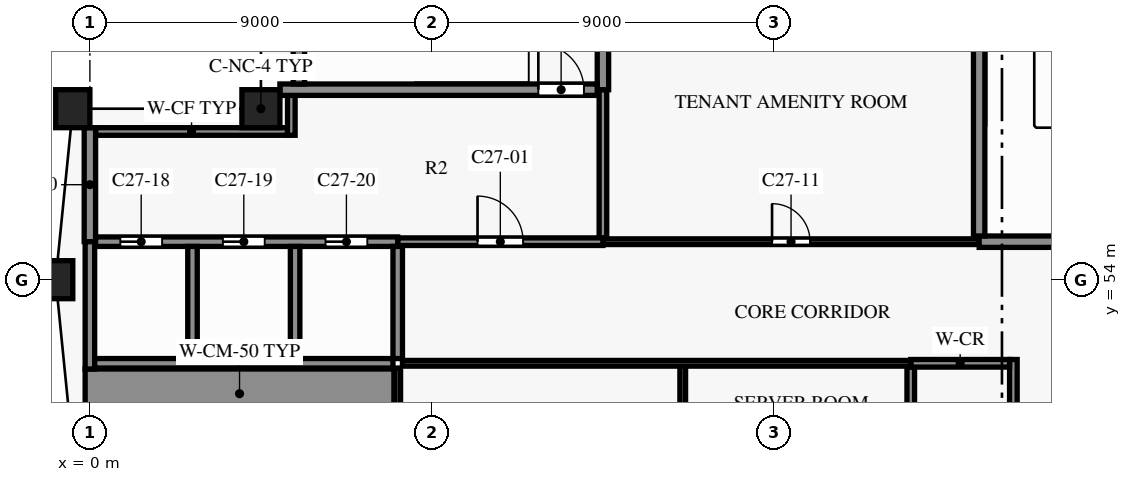
"""IFC4 building model, lengths in metres.
Left out: names, types, materials, properties, quantities, classifications, styles, units other than length and angle.
Written with IfcOpenShell. Run it as: python <this file> out.ifc"""

import sys

from ifc_helpers import new_model, si_unit, direction, frame, frame_2d, origin, origin_2d, place, context, subcontext, project, spatial, rectangle, extrude, element, fill, save


model = new_model("IFC4")
c1 = context("Model", 3, precision=1e-05, world=origin(), true_north=direction((0.0, 1.0)))
c2 = subcontext(c1, "Body", "Model", "MODEL_VIEW")
j1 = project(units=[si_unit("LENGTHUNIT", "METRE"), si_unit("PLANEANGLEUNIT", "RADIAN")], contexts=[c1])
p1 = place(None, origin())
s1 = spatial("IfcSite", under=j1, at=p1, CompositionType="ELEMENT")
p2 = place(p1, origin())
s2 = spatial("IfcBuilding", under=s1, at=p2, CompositionType="ELEMENT")
p3 = place(p2, frame((0.0, 0.0, 198.8)))
s3 = spatial("IfcBuildingStorey", under=s2, at=p3, CompositionType="ELEMENT", Elevation=198.8)
for number, where, z_axis, x_axis in (
    (1, (-0.45, 58.5, 0.0), (0.0, 0.0, 1.0), (-0.1, -0.995, 0.0)),
    (2, (-0.9, 54.0, 0.0), (0.0, 0.0, 1.0), (0.0, -1.0, 0.0)),
):
    element("IfcColumn", number, at=place(p3, frame(where, z_axis=z_axis, x_axis=x_axis)), inside=s3, PredefinedType="COLUMN", context=c2, shape_type="SweptSolid", body=[
        extrude(rectangle(XDim=0.9, YDim=1.0, at=origin_2d()), origin(), (0.0, 0.0, 1.0), 3.8),
    ])
p4 = place(p3, frame((4.5, 58.5, 0.0), z_axis=(0.0, 0.0, 1.0), x_axis=(1.0, 0.0, 0.0)))
e3 = element("IfcColumn", 3, at=p4, inside=s3, PredefinedType="COLUMN", context=c2, shape_type="SweptSolid", body=[
    extrude(rectangle(XDim=1.0, YDim=1.0, at=origin_2d()), origin(), (0.0, 0.0, 1.0), 3.8),
])
p5 = place(p3, frame((-0.125, 51.0, 0.0), z_axis=(0.0, 0.0, 1.0), x_axis=(1.0, 0.0, 0.0)))
e4 = element("IfcWall", 4, at=p5, inside=s3, PredefinedType="SHEAR", context=c2, shape_type="SweptSolid", body=[
    extrude(rectangle(XDim=8.125, YDim=1.3, at=frame_2d((4.062, 0.0))), origin(), (0.0, 0.0, 1.0), 3.5),
])
p6 = place(p3, frame((8.225, 51.8, 0.0), z_axis=(0.0, 0.0, 1.0), x_axis=(1.0, 0.0, 0.0)))
e5 = element("IfcWall", 5, at=p6, inside=s3, PredefinedType="PARTITIONING", context=c2, shape_type="SweptSolid", body=[
    extrude(rectangle(XDim=13.375, YDim=0.15, at=frame_2d((6.688, 0.0))), origin(), (0.0, 0.0, 1.0), 3.5),
])
p7 = place(p3, frame((21.6, 51.8, 0.0), z_axis=(0.0, 0.0, 1.0), x_axis=(1.0, 0.0, 0.0)))
e6 = element("IfcWall", 6, at=p7, inside=s3, PredefinedType="PARTITIONING", context=c2, shape_type="SweptSolid", body=[
    extrude(rectangle(XDim=2.6, YDim=0.2, at=frame_2d((1.3, 0.0))), origin(), (0.0, 0.0, 1.0), 3.5),
])
p8 = place(p3, frame((0.125, 51.8, 0.0), z_axis=(0.0, 0.0, 1.0), x_axis=(1.0, 0.0, 0.0)))
e7 = element("IfcWall", 7, at=p8, inside=s3, PredefinedType="SHEAR", context=c2, shape_type="SweptSolid", body=[
    extrude(rectangle(XDim=7.85, YDim=0.25, at=frame_2d((3.925, 0.0))), origin(), (0.0, 0.0, 1.0), 3.5),
])
p9 = place(p3, frame((8.1, 55.0, 0.0), z_axis=(0.0, 0.0, 1.0), x_axis=(1.0, 0.0, 0.0)))
e8 = element("IfcWall", 8, at=p9, inside=s3, PredefinedType="PARTITIONING", context=c2, shape_type="SweptSolid", body=[
    extrude(rectangle(XDim=5.4, YDim=0.2, at=frame_2d((2.7, 0.0))), origin(), (0.0, 0.0, 1.0), 3.5),
])
p10 = place(p9, frame((2.1, 0.0, 0.0)))
e9 = element("IfcOpeningElement", 9, at=p10, cuts=e8, PredefinedType="OPENING", context=c2, shape_type="SweptSolid", body=[
    extrude(rectangle(XDim=1.2, YDim=2.2, at=frame_2d((0.6, 1.1))), frame((0.0, 0.11, 0.0), z_axis=(0.0, -1.0, 0.0), x_axis=(1.0, 0.0, 0.0)), (0.0, 0.0, 1.0), 0.22),
])
p11 = place(p3, frame((13.5, 55.0, 0.0), z_axis=(0.0, 0.0, 1.0), x_axis=(1.0, 0.0, 0.0)))
e10 = element("IfcWall", 10, at=p11, inside=s3, PredefinedType="PARTITIONING", context=c2, shape_type="SweptSolid", body=[
    extrude(rectangle(XDim=9.9, YDim=0.15, at=frame_2d((4.95, 0.0))), origin(), (0.0, 0.0, 1.0), 3.5),
])
p12 = place(p11, frame((4.45, 0.0, 0.0)))
e11 = element("IfcOpeningElement", 11, at=p12, cuts=e10, PredefinedType="OPENING", context=c2, shape_type="SweptSolid", body=[
    extrude(rectangle(XDim=1.0, YDim=2.1, at=frame_2d((0.5, 1.05))), frame((0.0, 0.085, 0.0), z_axis=(0.0, -1.0, 0.0), x_axis=(1.0, 0.0, 0.0)), (0.0, 0.0, 1.0), 0.17),
])
p13 = place(p3, frame((0.15, 55.0, 0.0), z_axis=(0.0, 0.0, 1.0), x_axis=(1.0, 0.0, 0.0)))
e12 = element("IfcWall", 12, at=p13, inside=s3, PredefinedType="SHEAR", context=c2, shape_type="SweptSolid", body=[
    extrude(rectangle(XDim=7.95, YDim=0.25, at=frame_2d((3.975, 0.0))), origin(), (0.0, 0.0, 1.0), 3.5),
])
p14 = place(p13, frame((0.65, 0.0, 0.0)))
e13 = element("IfcOpeningElement", 13, at=p14, cuts=e12, PredefinedType="OPENING", context=c2, shape_type="SweptSolid", body=[
    extrude(rectangle(XDim=1.1, YDim=2.1, at=frame_2d((0.55, 1.05))), frame((0.0, 0.135, 0.0), z_axis=(0.0, -1.0, 0.0), x_axis=(1.0, 0.0, 0.0)), (0.0, 0.0, 1.0), 0.27),
])
p15 = place(p13, frame((3.35, 0.0, 0.0)))
e14 = element("IfcOpeningElement", 14, at=p15, cuts=e12, PredefinedType="OPENING", context=c2, shape_type="SweptSolid", body=[
    extrude(rectangle(XDim=1.1, YDim=2.1, at=frame_2d((0.55, 1.05))), frame((0.0, 0.135, 0.0), z_axis=(0.0, -1.0, 0.0), x_axis=(1.0, 0.0, 0.0)), (0.0, 0.0, 1.0), 0.27),
])
p16 = place(p13, frame((6.05, 0.0, 0.0)))
e15 = element("IfcOpeningElement", 15, at=p16, cuts=e12, PredefinedType="OPENING", context=c2, shape_type="SweptSolid", body=[
    extrude(rectangle(XDim=1.1, YDim=2.1, at=frame_2d((0.55, 1.05))), frame((0.0, 0.135, 0.0), z_axis=(0.0, -1.0, 0.0), x_axis=(1.0, 0.0, 0.0)), (0.0, 0.0, 1.0), 0.27),
])
p17 = place(p3, frame((23.4, 55.0, 0.0), z_axis=(0.0, 0.0, 1.0), x_axis=(1.0, 0.0, 0.0)))
e16 = element("IfcWall", 16, at=p17, inside=s3, PredefinedType="SHEAR", context=c2, shape_type="SweptSolid", body=[
    extrude(rectangle(XDim=3.45, YDim=0.3, at=frame_2d((1.725, 0.0))), origin(), (0.0, 0.0, 1.0), 3.5),
])
p18 = place(p3, frame((0.15, 57.9, 0.0), z_axis=(0.0, 0.0, 1.0), x_axis=(1.0, 0.0, 0.0)))
e17 = element("IfcWall", 17, at=p18, inside=s3, PredefinedType="PARTITIONING", context=c2, shape_type="SweptSolid", body=[
    extrude(rectangle(XDim=5.05, YDim=0.2, at=frame_2d((2.525, 0.0))), origin(), (0.0, 0.0, 1.0), 3.5),
])
p19 = place(p3, frame((5.0, 59.0, 0.0), z_axis=(0.0, 0.0, 1.0), x_axis=(1.0, 0.0, 0.0)))
e18 = element("IfcWall", 18, at=p19, inside=s3, PredefinedType="SHEAR", context=c2, shape_type="SweptSolid", body=[
    extrude(rectangle(XDim=8.35, YDim=0.3, at=frame_2d((4.175, 0.0))), origin(), (0.0, 0.0, 1.0), 3.5),
])
p20 = place(p19, frame((6.8, 0.0, 0.0)))
e19 = element("IfcOpeningElement", 19, at=p20, cuts=e18, PredefinedType="OPENING", context=c2, shape_type="SweptSolid", body=[
    extrude(rectangle(XDim=1.2, YDim=2.2, at=frame_2d((0.6, 1.1))), frame((0.0, 0.16, 0.0), z_axis=(0.0, -1.0, 0.0), x_axis=(1.0, 0.0, 0.0)), (0.0, 0.0, 1.0), 0.32),
])
p21 = place(p3, frame((0.0, 55.0, 0.0), z_axis=(0.0, 0.0, 1.0), x_axis=(0.0, 1.0, 0.0)))
e20 = element("IfcWall", 20, at=p21, inside=s3, PredefinedType="SHEAR", context=c2, shape_type="SweptSolid", body=[
    extrude(rectangle(XDim=3.0, YDim=0.3, at=frame_2d((1.5, 0.0))), origin(), (0.0, 0.0, 1.0), 3.5),
])
p22 = place(p3, frame((0.0, 51.65, 0.0), z_axis=(0.0, 0.0, 1.0), x_axis=(0.0, 1.0, 0.0)))
e21 = element("IfcWall", 21, at=p22, inside=s3, PredefinedType="SHEAR", context=c2, shape_type="SweptSolid", body=[
    extrude(rectangle(XDim=3.35, YDim=0.25, at=frame_2d((1.675, 0.0))), origin(), (0.0, 0.0, 1.0), 3.5),
])
p23 = place(p3, frame((2.7, 51.925, 0.0), z_axis=(0.0, 0.0, 1.0), x_axis=(0.0, 1.0, 0.0)))
e22 = element("IfcWall", 22, at=p23, inside=s3, PredefinedType="SHEAR", context=c2, shape_type="SweptSolid", body=[
    extrude(rectangle(XDim=2.95, YDim=0.25, at=frame_2d((1.475, 0.0))), origin(), (0.0, 0.0, 1.0), 3.5),
])
p24 = place(p3, frame((5.3, 57.8, 0.0), z_axis=(0.0, 0.0, 1.0), x_axis=(0.0, 1.0, 0.0)))
e23 = element("IfcWall", 23, at=p24, inside=s3, PredefinedType="PARTITIONING", context=c2, shape_type="SweptSolid", body=[
    extrude(rectangle(XDim=1.05, YDim=0.2, at=frame_2d((0.525, 0.0))), origin(), (0.0, 0.0, 1.0), 3.5),
])
p25 = place(p3, frame((5.4, 51.925, 0.0), z_axis=(0.0, 0.0, 1.0), x_axis=(0.0, 1.0, 0.0)))
e24 = element("IfcWall", 24, at=p25, inside=s3, PredefinedType="SHEAR", context=c2, shape_type="SweptSolid", body=[
    extrude(rectangle(XDim=2.95, YDim=0.25, at=frame_2d((1.475, 0.0))), origin(), (0.0, 0.0, 1.0), 3.5),
])
p26 = place(p3, frame((5.5, 59.15, 0.0), z_axis=(0.0, 0.0, 1.0), x_axis=(0.0, 1.0, 0.0)))
e25 = element("IfcWall", 25, at=p26, inside=s3, PredefinedType="SHEAR", context=c2, shape_type="SweptSolid", body=[
    extrude(rectangle(XDim=3.6, YDim=0.3, at=frame_2d((1.8, 0.0))), origin(), (0.0, 0.0, 1.0), 3.5),
])
p27 = place(p3, frame((8.1, 50.2, 0.0), z_axis=(0.0, 0.0, 1.0), x_axis=(0.0, 1.0, 0.0)))
e26 = element("IfcWall", 26, at=p27, inside=s3, PredefinedType="PARTITIONING", context=c2, shape_type="SweptSolid", body=[
    extrude(rectangle(XDim=1.475, YDim=0.15, at=frame_2d((0.738, 0.0))), origin(), (0.0, 0.0, 1.0), 3.5),
])
p28 = place(p3, frame((8.1, 51.925, 0.0), z_axis=(0.0, 0.0, 1.0), x_axis=(0.0, 1.0, 0.0)))
e27 = element("IfcWall", 27, at=p28, inside=s3, PredefinedType="SHEAR", context=c2, shape_type="SweptSolid", body=[
    extrude(rectangle(XDim=2.95, YDim=0.25, at=frame_2d((1.475, 0.0))), origin(), (0.0, 0.0, 1.0), 3.5),
])
p29 = place(p3, frame((13.5, 55.1, 0.0), z_axis=(0.0, 0.0, 1.0), x_axis=(0.0, 1.0, 0.0)))
e28 = element("IfcWall", 28, at=p29, inside=s3, PredefinedType="PARTITIONING", context=c2, shape_type="SweptSolid", body=[
    extrude(rectangle(XDim=3.9, YDim=0.2, at=frame_2d((1.95, 0.0))), origin(), (0.0, 0.0, 1.0), 3.5),
])
p30 = place(p3, frame((13.5, 59.0, 0.0), z_axis=(0.0, 0.0, 1.0), x_axis=(0.0, 1.0, 0.0)))
e29 = element("IfcWall", 29, at=p30, inside=s3, PredefinedType="SHEAR", context=c2, shape_type="SweptSolid", body=[
    extrude(rectangle(XDim=3.948, YDim=0.3, at=frame_2d((1.974, 0.0))), origin(), (0.0, 0.0, 1.0), 3.5),
])
p31 = place(p3, frame((15.6, 47.075, 0.0), z_axis=(0.0, 0.0, 1.0), x_axis=(0.0, 1.0, 0.0)))
e30 = element("IfcWall", 30, at=p31, inside=s3, PredefinedType="PARTITIONING", context=c2, shape_type="SweptSolid", body=[
    extrude(rectangle(XDim=4.65, YDim=0.15, at=frame_2d((2.325, 0.0))), origin(), (0.0, 0.0, 1.0), 3.5),
])
p32 = place(p3, frame((21.6, 47.1, 0.0), z_axis=(0.0, 0.0, 1.0), x_axis=(0.0, 1.0, 0.0)))
e31 = element("IfcWall", 31, at=p32, inside=s3, PredefinedType="PARTITIONING", context=c2, shape_type="SweptSolid", body=[
    extrude(rectangle(XDim=4.6, YDim=0.2, at=frame_2d((2.3, 0.0))), origin(), (0.0, 0.0, 1.0), 3.5),
])
p33 = place(p3, frame((23.4, 55.15, 0.0), z_axis=(0.0, 0.0, 1.0), x_axis=(0.0, 1.0, 0.0)))
e32 = element("IfcWall", 32, at=p33, inside=s3, PredefinedType="SHEAR", context=c2, shape_type="SweptSolid", body=[
    extrude(rectangle(XDim=8.0, YDim=0.3, at=frame_2d((4.0, 0.0))), origin(), (0.0, 0.0, 1.0), 3.5),
])
p34 = place(p3, frame((24.3, 46.9, 0.0), z_axis=(0.0, 0.0, 1.0), x_axis=(0.0, 1.0, 0.0)))
e33 = element("IfcWall", 33, at=p34, inside=s3, PredefinedType="SHEAR", context=c2, shape_type="SweptSolid", body=[
    extrude(rectangle(XDim=5.0, YDim=0.2, at=frame_2d((2.5, 0.0))), origin(), (0.0, 0.0, 1.0), 3.5),
])
p35 = place(p10, origin())
e34 = element("IfcDoor", 34, at=p35, inside=s3, OperationType="SINGLE_SWING_RIGHT", PredefinedType="DOOR", context=c2, shape_type="SweptSolid", body=[
    extrude(rectangle(XDim=1.2, YDim=2.2, at=frame_2d((0.6, 1.1))), frame((0.0, 0.025, 0.0), z_axis=(0.0, -1.0, 0.0), x_axis=(1.0, 0.0, 0.0)), (0.0, 0.0, 1.0), 0.05),
])
fill(e9, e34)
p36 = place(p12, origin())
e35 = element("IfcDoor", 35, at=p36, inside=s3, OperationType="SINGLE_SWING_LEFT", PredefinedType="DOOR", context=c2, shape_type="SweptSolid", body=[
    extrude(rectangle(XDim=1.0, YDim=2.1, at=frame_2d((0.5, 1.05))), frame((0.0, 0.025, 0.0), z_axis=(0.0, -1.0, 0.0), x_axis=(1.0, 0.0, 0.0)), (0.0, 0.0, 1.0), 0.05),
])
fill(e11, e35)
p37 = place(p20, origin())
e36 = element("IfcDoor", 36, at=p37, inside=s3, OperationType="SINGLE_SWING_RIGHT", PredefinedType="DOOR", context=c2, shape_type="SweptSolid", body=[
    extrude(rectangle(XDim=1.2, YDim=2.2, at=frame_2d((0.6, 1.1))), frame((0.0, 0.025, 0.0), z_axis=(0.0, -1.0, 0.0), x_axis=(1.0, 0.0, 0.0)), (0.0, 0.0, 1.0), 0.05),
])
fill(e19, e36)
p38 = place(p14, origin())
e37 = element("IfcDoor", 37, at=p38, inside=s3, OperationType="DOUBLE_DOOR_SLIDING", PredefinedType="DOOR", context=c2, shape_type="SweptSolid", body=[
    extrude(rectangle(XDim=1.1, YDim=2.1, at=frame_2d((0.55, 1.05))), frame((0.0, 0.025, 0.0), z_axis=(0.0, -1.0, 0.0), x_axis=(1.0, 0.0, 0.0)), (0.0, 0.0, 1.0), 0.05),
])
fill(e13, e37)
p39 = place(p15, origin())
e38 = element("IfcDoor", 38, at=p39, inside=s3, OperationType="DOUBLE_DOOR_SLIDING", PredefinedType="DOOR", context=c2, shape_type="SweptSolid", body=[
    extrude(rectangle(XDim=1.1, YDim=2.1, at=frame_2d((0.55, 1.05))), frame((0.0, 0.025, 0.0), z_axis=(0.0, -1.0, 0.0), x_axis=(1.0, 0.0, 0.0)), (0.0, 0.0, 1.0), 0.05),
])
fill(e14, e38)
p40 = place(p16, origin())
e39 = element("IfcDoor", 39, at=p40, inside=s3, OperationType="DOUBLE_DOOR_SLIDING", PredefinedType="DOOR", context=c2, shape_type="SweptSolid", body=[
    extrude(rectangle(XDim=1.1, YDim=2.1, at=frame_2d((0.55, 1.05))), frame((0.0, 0.025, 0.0), z_axis=(0.0, -1.0, 0.0), x_axis=(1.0, 0.0, 0.0)), (0.0, 0.0, 1.0), 0.05),
])
fill(e15, e39)
save(model, sys.argv[1])
